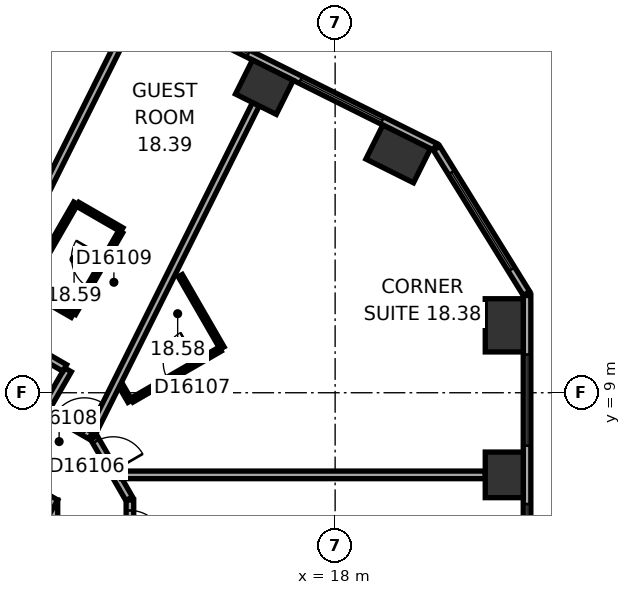
"""IFC4 building model, lengths in metres.
Left out: names, types, materials, properties, quantities, classifications, styles, units other than length and angle.
Written with IfcOpenShell. Run it as: python <this file> out.ifc"""

import sys

from ifc_helpers import new_model, si_unit, direction, frame, frame_2d, origin, origin_2d, place, context, subcontext, project, spatial, rectangle, extrude, element, fill, save


model = new_model("IFC4")
c1 = context("Model", 3, precision=1e-05, world=origin(), true_north=direction((0.0, 1.0)))
c2 = subcontext(c1, "Body", "Model", "MODEL_VIEW")
j1 = project(units=[si_unit("LENGTHUNIT", "METRE"), si_unit("PLANEANGLEUNIT", "RADIAN")], contexts=[c1])
p1 = place(None, origin())
s1 = spatial("IfcSite", under=j1, at=p1, CompositionType="ELEMENT")
p2 = place(p1, origin())
s2 = spatial("IfcBuilding", under=s1, at=p2, CompositionType="ELEMENT")
p3 = place(p2, frame((0.0, 0.0, 83.6)))
s3 = spatial("IfcBuildingStorey", under=s2, at=p3, CompositionType="ELEMENT", Elevation=83.6)
p4 = place(p3, frame((22.45, 6.839, 0.0), z_axis=(0.0, 0.0, 1.0), x_axis=(0.0, 1.0, 0.0)))
e1 = element("IfcColumn", 1, at=p4, inside=s3, PredefinedType="COLUMN", context=c2, shape_type="SweptSolid", body=[
    extrude(rectangle(XDim=1.2, YDim=1.0, at=origin_2d()), origin(), (0.0, 0.0, 1.0), 3.3),
])
for number, where, z_axis, x_axis in (
    (2, (22.45, 10.774, 0.0), (0.0, 0.0, 1.0), (0.0, 1.0, 0.0)),
    (3, (19.659, 15.284, 0.0), (0.0, 0.0, 1.0), (-0.895, 0.446, 0.0)),
):
    element("IfcColumn", number, at=place(p3, frame(where, z_axis=z_axis, x_axis=x_axis)), inside=s3, PredefinedType="COLUMN", context=c2, shape_type="SweptSolid", body=[
        extrude(rectangle(XDim=1.4, YDim=1.0, at=origin_2d()), origin(), (0.0, 0.0, 1.0), 3.3),
    ])
p5 = place(p3, frame((16.138, 17.04, 0.0), z_axis=(0.0, 0.0, 1.0), x_axis=(-0.894934361602, 0.44619781311, 0.0)))
e4 = element("IfcColumn", 4, at=p5, inside=s3, PredefinedType="COLUMN", context=c2, shape_type="SweptSolid", body=[
    extrude(rectangle(XDim=1.2, YDim=1.0, at=origin_2d()), origin(), (0.0, 0.0, 1.0), 3.3),
])
p6 = place(p3, frame((10.1, -6.177, 0.0), z_axis=(0.0, 0.0, 1.0), x_axis=(0.0, 1.0, 0.0)))
e5 = element("IfcWall", 5, at=p6, inside=s3, PredefinedType="SHEAR", context=c2, shape_type="SweptSolid", body=[
    extrude(rectangle(XDim=12.355, YDim=1.2, at=frame_2d((6.177, 0.0))), origin(), (0.0, 0.0, 1.0), 3.3),
])
p7 = place(p6, frame((6.378, 0.0, 0.0)))
e6 = element("IfcOpeningElement", 6, at=p7, cuts=e5, PredefinedType="OPENING", context=c2, shape_type="SweptSolid", body=[
    extrude(rectangle(XDim=1.5, YDim=2.1, at=frame_2d((0.75, 1.05))), frame((0.0, 0.61, 0.0), z_axis=(0.0, -1.0, 0.0), x_axis=(1.0, 0.0, 0.0)), (0.0, 0.0, 1.0), 1.22),
])
p8 = place(p6, frame((1.828, 0.0, 0.0)))
e7 = element("IfcOpeningElement", 7, at=p8, cuts=e5, PredefinedType="OPENING", context=c2, shape_type="SweptSolid", body=[
    extrude(rectangle(XDim=1.1, YDim=2.1, at=frame_2d((0.55, 1.05))), frame((0.0, 0.61, 0.0), z_axis=(0.0, -1.0, 0.0), x_axis=(1.0, 0.0, 0.0)), (0.0, 0.0, 1.0), 1.22),
])
p9 = place(p6, frame((4.427, 0.0, 0.0)))
e8 = element("IfcOpeningElement", 8, at=p9, cuts=e5, PredefinedType="OPENING", context=c2, shape_type="SweptSolid", body=[
    extrude(rectangle(XDim=1.1, YDim=2.1, at=frame_2d((0.55, 1.05))), frame((0.0, 0.61, 0.0), z_axis=(0.0, -1.0, 0.0), x_axis=(1.0, 0.0, 0.0)), (0.0, 0.0, 1.0), 1.22),
])
p10 = place(p3, frame((10.4, 5.658, 0.0), z_axis=(0.0, 0.0, 1.0), x_axis=(-0.866021384402, 0.500006961711, 0.0)))
e9 = element("IfcWall", 9, at=p10, inside=s3, PredefinedType="SHEAR", context=c2, shape_type="SweptSolid", body=[
    extrude(rectangle(XDim=12.355, YDim=1.2, at=frame_2d((6.178, 0.0))), origin(), (0.0, 0.0, 1.0), 3.3),
])
p11 = place(p10, frame((2.728, 0.0, 0.0)))
e10 = element("IfcOpeningElement", 10, at=p11, cuts=e9, PredefinedType="OPENING", context=c2, shape_type="SweptSolid", body=[
    extrude(rectangle(XDim=1.1, YDim=2.1, at=frame_2d((0.55, 1.05))), frame((0.0, 0.61, 0.0), z_axis=(0.0, -1.0, 0.0), x_axis=(1.0, 0.0, 0.0)), (0.0, 0.0, 1.0), 1.22),
])
p12 = place(p10, frame((5.328, 0.0, 0.0)))
e11 = element("IfcOpeningElement", 11, at=p12, cuts=e9, PredefinedType="OPENING", context=c2, shape_type="SweptSolid", body=[
    extrude(rectangle(XDim=1.1, YDim=2.1, at=frame_2d((0.55, 1.05))), frame((0.0, 0.61, 0.0), z_axis=(0.0, -1.0, 0.0), x_axis=(1.0, 0.0, 0.0)), (0.0, 0.0, 1.0), 1.22),
])
p13 = place(p10, frame((7.928, 0.0, 0.0)))
e12 = element("IfcOpeningElement", 12, at=p13, cuts=e9, PredefinedType="OPENING", context=c2, shape_type="SweptSolid", body=[
    extrude(rectangle(XDim=1.1, YDim=2.1, at=frame_2d((0.55, 1.05))), frame((0.0, 0.61, 0.0), z_axis=(0.0, -1.0, 0.0), x_axis=(1.0, 0.0, 0.0)), (0.0, 0.0, 1.0), 1.22),
])
p14 = place(p3, frame((23.05, -9.687, 0.0), z_axis=(0.0, 0.0, 1.0), x_axis=(0.0, 1.0, 0.0)))
e13 = element("IfcWall", 13, at=p14, inside=s3, PredefinedType="STANDARD", context=c2, shape_type="SweptSolid", body=[
    extrude(rectangle(XDim=21.246, YDim=0.2, at=frame_2d((10.623, 0.0))), origin(), (0.0, 0.0, 1.0), 3.3),
])
p15 = place(p14, frame((1.555, 0.0, 0.8)))
e14 = element("IfcOpeningElement", 14, at=p15, cuts=e13, PredefinedType="OPENING", context=c2, shape_type="SweptSolid", body=[
    extrude(rectangle(XDim=2.4, YDim=1.7, at=frame_2d((1.2, 0.85))), frame((0.0, 0.11, 0.0), z_axis=(0.0, -1.0, 0.0), x_axis=(1.0, 0.0, 0.0)), (0.0, 0.0, 1.0), 0.22),
])
p16 = place(p14, frame((5.489, 0.0, 0.8)))
e15 = element("IfcOpeningElement", 15, at=p16, cuts=e13, PredefinedType="OPENING", context=c2, shape_type="SweptSolid", body=[
    extrude(rectangle(XDim=2.4, YDim=1.7, at=frame_2d((1.2, 0.85))), frame((0.0, 0.11, 0.0), z_axis=(0.0, -1.0, 0.0), x_axis=(1.0, 0.0, 0.0)), (0.0, 0.0, 1.0), 0.22),
])
p17 = place(p14, frame((9.424, 0.0, 0.8)))
e16 = element("IfcOpeningElement", 16, at=p17, cuts=e13, PredefinedType="OPENING", context=c2, shape_type="SweptSolid", body=[
    extrude(rectangle(XDim=2.4, YDim=1.7, at=frame_2d((1.2, 0.85))), frame((0.0, 0.11, 0.0), z_axis=(0.0, -1.0, 0.0), x_axis=(1.0, 0.0, 0.0)), (0.0, 0.0, 1.0), 0.22),
])
p18 = place(p14, frame((13.358, 0.0, 0.8)))
e17 = element("IfcOpeningElement", 17, at=p18, cuts=e13, PredefinedType="OPENING", context=c2, shape_type="SweptSolid", body=[
    extrude(rectangle(XDim=2.4, YDim=1.7, at=frame_2d((1.2, 0.85))), frame((0.0, 0.11, 0.0), z_axis=(0.0, -1.0, 0.0), x_axis=(1.0, 0.0, 0.0)), (0.0, 0.0, 1.0), 0.22),
])
p19 = place(p14, frame((17.293, 0.0, 0.8)))
e18 = element("IfcOpeningElement", 18, at=p19, cuts=e13, PredefinedType="OPENING", context=c2, shape_type="SweptSolid", body=[
    extrude(rectangle(XDim=2.4, YDim=1.7, at=frame_2d((1.2, 0.85))), frame((0.0, 0.11, 0.0), z_axis=(0.0, -1.0, 0.0), x_axis=(1.0, 0.0, 0.0)), (0.0, 0.0, 1.0), 0.22),
])
p20 = place(p3, frame((23.035, 11.612, 0.0), z_axis=(0.0, 0.0, 1.0), x_axis=(-0.526160091227, 0.850385535155, 0.0)))
e19 = element("IfcWall", 19, at=p20, inside=s3, PredefinedType="STANDARD", context=c2, shape_type="SweptSolid", body=[
    extrude(rectangle(XDim=4.494, YDim=0.2, at=frame_2d((2.247, 0.0))), origin(), (0.0, 0.0, 1.0), 3.3),
])
p21 = place(p20, frame((0.747, 0.0, 0.8)))
e20 = element("IfcOpeningElement", 20, at=p21, cuts=e19, PredefinedType="OPENING", context=c2, shape_type="SweptSolid", body=[
    extrude(rectangle(XDim=3.0, YDim=1.7, at=frame_2d((1.5, 0.85))), frame((0.0, 0.11, 0.0), z_axis=(0.0, -1.0, 0.0), x_axis=(1.0, 0.0, 0.0)), (0.0, 0.0, 1.0), 0.22),
])
p22 = place(p3, frame((20.63, 15.47, 0.0), z_axis=(0.0, 0.0, 1.0), x_axis=(-0.894934518609, 0.446197498203, 0.0)))
e21 = element("IfcWall", 21, at=p22, inside=s3, PredefinedType="STANDARD", context=c2, shape_type="SweptSolid", body=[
    extrude(rectangle(XDim=21.246, YDim=0.2, at=frame_2d((10.623, 0.0))), origin(), (0.0, 0.0, 1.0), 3.3),
])
p23 = place(p22, frame((1.553, 0.0, 0.8)))
e22 = element("IfcOpeningElement", 22, at=p23, cuts=e21, PredefinedType="OPENING", context=c2, shape_type="SweptSolid", body=[
    extrude(rectangle(XDim=2.4, YDim=1.7, at=frame_2d((1.2, 0.85))), frame((0.0, 0.11, 0.0), z_axis=(0.0, -1.0, 0.0), x_axis=(1.0, 0.0, 0.0)), (0.0, 0.0, 1.0), 0.22),
])
p24 = place(p22, frame((5.488, 0.0, 0.8)))
e23 = element("IfcOpeningElement", 23, at=p24, cuts=e21, PredefinedType="OPENING", context=c2, shape_type="SweptSolid", body=[
    extrude(rectangle(XDim=2.4, YDim=1.7, at=frame_2d((1.2, 0.85))), frame((0.0, 0.11, 0.0), z_axis=(0.0, -1.0, 0.0), x_axis=(1.0, 0.0, 0.0)), (0.0, 0.0, 1.0), 0.22),
])
p25 = place(p22, frame((9.422, 0.0, 0.8)))
e24 = element("IfcOpeningElement", 24, at=p25, cuts=e21, PredefinedType="OPENING", context=c2, shape_type="SweptSolid", body=[
    extrude(rectangle(XDim=2.4, YDim=1.7, at=frame_2d((1.2, 0.85))), frame((0.0, 0.11, 0.0), z_axis=(0.0, -1.0, 0.0), x_axis=(1.0, 0.0, 0.0)), (0.0, 0.0, 1.0), 0.22),
])
p26 = place(p22, frame((13.357, 0.0, 0.8)))
e25 = element("IfcOpeningElement", 25, at=p26, cuts=e21, PredefinedType="OPENING", context=c2, shape_type="SweptSolid", body=[
    extrude(rectangle(XDim=2.4, YDim=1.7, at=frame_2d((1.2, 0.85))), frame((0.0, 0.11, 0.0), z_axis=(0.0, -1.0, 0.0), x_axis=(1.0, 0.0, 0.0)), (0.0, 0.0, 1.0), 0.22),
])
p27 = place(p22, frame((17.292, 0.0, 0.8)))
e26 = element("IfcOpeningElement", 26, at=p27, cuts=e21, PredefinedType="OPENING", context=c2, shape_type="SweptSolid", body=[
    extrude(rectangle(XDim=2.4, YDim=1.7, at=frame_2d((1.2, 0.85))), frame((0.0, 0.11, 0.0), z_axis=(0.0, -1.0, 0.0), x_axis=(1.0, 0.0, 0.0)), (0.0, 0.0, 1.0), 0.22),
])
p28 = place(p3, frame((9.875, 11.736, 0.0), z_axis=(0.0, 0.0, 1.0), x_axis=(0.499936506574, 0.866062058628, 0.0)))
e27 = element("IfcWall", 27, at=p28, inside=s3, PredefinedType="PARTITIONING", context=c2, shape_type="SweptSolid", body=[
    extrude(rectangle(XDim=2.6, YDim=0.12, at=frame_2d((1.3, 0.0))), origin(), (0.0, 0.0, 1.0), 3.05),
])
p29 = place(p3, frame((10.371, 8.561, 0.0), z_axis=(0.0, 0.0, 1.0), x_axis=(0.499986357472, 0.866033280158, 0.0)))
e28 = element("IfcWall", 28, at=p29, inside=s3, PredefinedType="PARTITIONING", context=c2, shape_type="SweptSolid", body=[
    extrude(rectangle(XDim=1.201, YDim=0.2, at=frame_2d((0.601, 0.0))), origin(), (0.0, 0.0, 1.0), 3.05),
])
p30 = place(p3, frame((10.885, 9.652, 0.0), z_axis=(0.0, 0.0, 1.0), x_axis=(-0.866033277307, 0.499986362411, 0.0)))
e29 = element("IfcWall", 29, at=p30, inside=s3, PredefinedType="PARTITIONING", context=c2, shape_type="SweptSolid", body=[
    extrude(rectangle(XDim=8.702, YDim=0.2, at=frame_2d((4.351, 0.0))), origin(), (0.0, 0.0, 1.0), 3.05),
])
p31 = place(p30, frame((3.844, 0.0, 0.0)))
e30 = element("IfcOpeningElement", 30, at=p31, cuts=e29, PredefinedType="OPENING", context=c2, shape_type="SweptSolid", body=[
    extrude(rectangle(XDim=0.9, YDim=2.1, at=frame_2d((0.45, 1.05))), frame((0.0, 0.11, 0.0), z_axis=(0.0, -1.0, 0.0), x_axis=(1.0, 0.0, 0.0)), (0.0, 0.0, 1.0), 0.22),
])
for number, where, z_axis, x_axis in (
    (31, (11.087, 11.036, 0.0), (0.0, 0.0, 1.0), (-0.866, 0.5, 0.0)),
    (32, (11.226, 13.958, 0.0), (0.0, 0.0, 1.0), (0.866, -0.5, 0.0)),
):
    element("IfcWall", number, at=place(p3, frame(where, z_axis=z_axis, x_axis=x_axis)), inside=s3, PredefinedType="PARTITIONING", context=c2, shape_type="SweptSolid", body=[
        extrude(rectangle(XDim=1.34, YDim=0.12, at=frame_2d((0.67, 0.0))), origin(), (0.0, 0.0, 1.0), 3.05),
    ])
p32 = place(p3, frame((11.566, 7.871, 0.0), z_axis=(0.0, 0.0, 1.0), x_axis=(-0.866004557827, 0.500036104519, 0.0)))
e33 = element("IfcWall", 33, at=p32, inside=s3, PredefinedType="PARTITIONING", context=c2, shape_type="SweptSolid", body=[
    extrude(rectangle(XDim=1.28, YDim=0.2, at=frame_2d((0.64, 0.0))), origin(), (0.0, 0.0, 1.0), 3.05),
])
p33 = place(p32, frame((0.19, 0.0, 0.0)))
e34 = element("IfcOpeningElement", 34, at=p33, cuts=e33, PredefinedType="OPENING", context=c2, shape_type="SweptSolid", body=[
    extrude(rectangle(XDim=0.9, YDim=2.1, at=frame_2d((0.45, 1.05))), frame((0.0, 0.11, 0.0), z_axis=(0.0, -1.0, 0.0), x_axis=(1.0, 0.0, 0.0)), (0.0, 0.0, 1.0), 0.22),
])
p34 = place(p3, frame((12.357, 13.236, 0.0), z_axis=(0.0, 0.0, 1.0), x_axis=(-0.50000366821, -0.866023285932, 0.0)))
e35 = element("IfcWall", 35, at=p34, inside=s3, PredefinedType="PARTITIONING", context=c2, shape_type="SweptSolid", body=[
    extrude(rectangle(XDim=2.48, YDim=0.12, at=frame_2d((1.24, 0.0))), origin(), (0.0, 0.0, 1.0), 3.05),
])
p35 = place(p34, frame((0.79, 0.0, 0.0)))
e36 = element("IfcOpeningElement", 36, at=p35, cuts=e35, PredefinedType="OPENING", context=c2, shape_type="SweptSolid", body=[
    extrude(rectangle(XDim=0.9, YDim=2.1, at=frame_2d((0.45, 1.05))), frame((0.0, 0.07, 0.0), z_axis=(0.0, -1.0, 0.0), x_axis=(1.0, 0.0, 0.0)), (0.0, 0.0, 1.0), 0.14),
])
p36 = place(p3, frame((12.393, 18.348, 0.0), z_axis=(0.0, 0.0, 1.0), x_axis=(-0.446176022699, -0.894945225569, 0.0)))
e37 = element("IfcWall", 37, at=p36, inside=s3, PredefinedType="PARTITIONING", context=c2, shape_type="SweptSolid", body=[
    extrude(rectangle(XDim=8.191, YDim=0.2, at=frame_2d((4.095, 0.0))), origin(), (0.0, 0.0, 1.0), 2.6),
])
p37 = place(p3, frame((12.58, 6.212, 0.0), z_axis=(0.0, 0.0, 1.0), x_axis=(-0.500063286585, 0.865988862174, 0.0)))
e38 = element("IfcWall", 38, at=p37, inside=s3, PredefinedType="PARTITIONING", context=c2, shape_type="SweptSolid", body=[
    extrude(rectangle(XDim=1.86, YDim=0.2, at=frame_2d((0.93, 0.0))), origin(), (0.0, 0.0, 1.0), 3.05),
])
p38 = place(p37, frame((0.842, 0.0, 0.0)))
e39 = element("IfcOpeningElement", 39, at=p38, cuts=e38, PredefinedType="OPENING", context=c2, shape_type="SweptSolid", body=[
    extrude(rectangle(XDim=0.9, YDim=2.1, at=frame_2d((0.45, 1.05))), frame((0.0, 0.11, 0.0), z_axis=(0.0, -1.0, 0.0), x_axis=(1.0, 0.0, 0.0)), (0.0, 0.0, 1.0), 0.22),
])
p39 = place(p3, frame((12.6, 3.004, 0.0), z_axis=(0.0, 0.0, 1.0), x_axis=(0.0, 1.0, 0.0)))
e40 = element("IfcWall", 40, at=p39, inside=s3, PredefinedType="PARTITIONING", context=c2, shape_type="SweptSolid", body=[
    extrude(rectangle(XDim=3.173, YDim=0.2, at=frame_2d((1.586, 0.0))), origin(), (0.0, 0.0, 1.0), 3.05),
])
p40 = place(p39, frame((1.998, 0.0, 0.0)))
e41 = element("IfcOpeningElement", 41, at=p40, cuts=e40, PredefinedType="OPENING", context=c2, shape_type="SweptSolid", body=[
    extrude(rectangle(XDim=0.9, YDim=2.1, at=frame_2d((0.45, 1.05))), frame((0.0, 0.11, 0.0), z_axis=(0.0, -1.0, 0.0), x_axis=(1.0, 0.0, 0.0)), (0.0, 0.0, 1.0), 0.22),
])
p41 = place(p3, frame((12.601, 8.776, 0.0), z_axis=(0.0, 0.0, 1.0), x_axis=(-0.500166486798, 0.865929261247, 0.0)))
e42 = element("IfcWall", 42, at=p41, inside=s3, PredefinedType="PARTITIONING", context=c2, shape_type="SweptSolid", body=[
    extrude(rectangle(XDim=0.476, YDim=0.12, at=frame_2d((0.238, 0.0))), origin(), (0.0, 0.0, 1.0), 3.05),
])
p42 = place(p3, frame((13.926, 12.081, 0.0), z_axis=(0.0, 0.0, 1.0), x_axis=(0.499994660107, -0.866028486751, 0.0)))
e43 = element("IfcWall", 43, at=p42, inside=s3, PredefinedType="PARTITIONING", context=c2, shape_type="SweptSolid", body=[
    extrude(rectangle(XDim=2.2, YDim=0.12, at=frame_2d((1.1, 0.0))), origin(), (0.0, 0.0, 1.0), 3.05),
])
p43 = place(p3, frame((14.974, 10.146, 0.0), z_axis=(0.0, 0.0, 1.0), x_axis=(-0.86599746015, -0.500048396672, 0.0)))
e44 = element("IfcWall", 44, at=p43, inside=s3, PredefinedType="PARTITIONING", context=c2, shape_type="SweptSolid", body=[
    extrude(rectangle(XDim=2.68, YDim=0.12, at=frame_2d((1.34, 0.0))), origin(), (0.0, 0.0, 1.0), 3.05),
])
p44 = place(p43, frame((0.69, 0.0, 0.0)))
e45 = element("IfcOpeningElement", 45, at=p44, cuts=e44, PredefinedType="OPENING", context=c2, shape_type="SweptSolid", body=[
    extrude(rectangle(XDim=0.9, YDim=2.1, at=frame_2d((0.45, 1.05))), frame((0.0, 0.07, 0.0), z_axis=(0.0, -1.0, 0.0), x_axis=(1.0, 0.0, 0.0)), (0.0, 0.0, 1.0), 0.14),
])
p45 = place(p3, frame((15.915, 16.592, 0.0), z_axis=(0.0, 0.0, 1.0), x_axis=(-0.446199736347, -0.894933402709, 0.0)))
e46 = element("IfcWall", 46, at=p45, inside=s3, PredefinedType="PARTITIONING", context=c2, shape_type="SweptSolid", body=[
    extrude(rectangle(XDim=9.635, YDim=0.2, at=frame_2d((4.817, 0.0))), origin(), (0.0, 0.0, 1.0), 3.05),
])
p46 = place(p3, frame((21.95, 6.839, 0.0), z_axis=(0.0, 0.0, 1.0), x_axis=(-1.0, 0.0, 0.0)))
e47 = element("IfcWall", 47, at=p46, inside=s3, PredefinedType="PARTITIONING", context=c2, shape_type="SweptSolid", body=[
    extrude(rectangle(XDim=9.572, YDim=0.2, at=frame_2d((4.786, 0.0))), origin(), (0.0, 0.0, 1.0), 3.05),
])
p47 = place(p18, origin())
e48 = element("IfcWindow", 48, at=p47, inside=s3, PartitioningType="SINGLE_PANEL", PredefinedType="WINDOW", context=c2, shape_type="SweptSolid", body=[
    extrude(rectangle(XDim=2.4, YDim=1.7, at=frame_2d((1.2, 0.85))), frame((0.0, 0.03, 0.0), z_axis=(0.0, -1.0, 0.0), x_axis=(1.0, 0.0, 0.0)), (0.0, 0.0, 1.0), 0.06),
])
fill(e17, e48)
p48 = place(p19, origin())
e49 = element("IfcWindow", 49, at=p48, inside=s3, PartitioningType="SINGLE_PANEL", PredefinedType="WINDOW", context=c2, shape_type="SweptSolid", body=[
    extrude(rectangle(XDim=2.4, YDim=1.7, at=frame_2d((1.2, 0.85))), frame((0.0, 0.03, 0.0), z_axis=(0.0, -1.0, 0.0), x_axis=(1.0, 0.0, 0.0)), (0.0, 0.0, 1.0), 0.06),
])
fill(e18, e49)
p49 = place(p21, origin())
e50 = element("IfcWindow", 50, at=p49, inside=s3, PartitioningType="SINGLE_PANEL", PredefinedType="WINDOW", context=c2, shape_type="SweptSolid", body=[
    extrude(rectangle(XDim=3.0, YDim=1.7, at=frame_2d((1.5, 0.85))), frame((0.0, 0.03, 0.0), z_axis=(0.0, -1.0, 0.0), x_axis=(1.0, 0.0, 0.0)), (0.0, 0.0, 1.0), 0.06),
])
fill(e20, e50)
p50 = place(p23, origin())
e51 = element("IfcWindow", 51, at=p50, inside=s3, PartitioningType="SINGLE_PANEL", PredefinedType="WINDOW", context=c2, shape_type="SweptSolid", body=[
    extrude(rectangle(XDim=2.4, YDim=1.7, at=frame_2d((1.2, 0.85))), frame((0.0, 0.03, 0.0), z_axis=(0.0, -1.0, 0.0), x_axis=(1.0, 0.0, 0.0)), (0.0, 0.0, 1.0), 0.06),
])
fill(e22, e51)
p51 = place(p24, origin())
e52 = element("IfcWindow", 52, at=p51, inside=s3, PartitioningType="SINGLE_PANEL", PredefinedType="WINDOW", context=c2, shape_type="SweptSolid", body=[
    extrude(rectangle(XDim=2.4, YDim=1.7, at=frame_2d((1.2, 0.85))), frame((0.0, 0.03, 0.0), z_axis=(0.0, -1.0, 0.0), x_axis=(1.0, 0.0, 0.0)), (0.0, 0.0, 1.0), 0.06),
])
fill(e23, e52)
p52 = place(p40, origin())
e53 = element("IfcDoor", 53, at=p52, inside=s3, OperationType="SINGLE_SWING_LEFT", PredefinedType="DOOR", context=c2, shape_type="SweptSolid", body=[
    extrude(rectangle(XDim=0.9, YDim=2.1, at=frame_2d((0.45, 1.05))), frame((0.0, 0.025, 0.0), z_axis=(0.0, -1.0, 0.0), x_axis=(1.0, 0.0, 0.0)), (0.0, 0.0, 1.0), 0.05),
])
fill(e41, e53)
p53 = place(p38, origin())
e54 = element("IfcDoor", 54, at=p53, inside=s3, OperationType="SINGLE_SWING_LEFT", PredefinedType="DOOR", context=c2, shape_type="SweptSolid", body=[
    extrude(rectangle(XDim=0.9, YDim=2.1, at=frame_2d((0.45, 1.05))), frame((0.0, 0.025, 0.0), z_axis=(0.0, -1.0, 0.0), x_axis=(1.0, 0.0, 0.0)), (0.0, 0.0, 1.0), 0.05),
])
fill(e39, e54)
p54 = place(p44, origin())
e55 = element("IfcDoor", 55, at=p54, inside=s3, OperationType="SINGLE_SWING_LEFT", PredefinedType="DOOR", context=c2, shape_type="SweptSolid", body=[
    extrude(rectangle(XDim=0.9, YDim=2.1, at=frame_2d((0.45, 1.05))), frame((0.0, 0.025, 0.0), z_axis=(0.0, -1.0, 0.0), x_axis=(1.0, 0.0, 0.0)), (0.0, 0.0, 1.0), 0.05),
])
fill(e45, e55)
p55 = place(p33, origin())
e56 = element("IfcDoor", 56, at=p55, inside=s3, OperationType="SINGLE_SWING_LEFT", PredefinedType="DOOR", context=c2, shape_type="SweptSolid", body=[
    extrude(rectangle(XDim=0.9, YDim=2.1, at=frame_2d((0.45, 1.05))), frame((0.0, 0.025, 0.0), z_axis=(0.0, -1.0, 0.0), x_axis=(1.0, 0.0, 0.0)), (0.0, 0.0, 1.0), 0.05),
])
fill(e34, e56)
p56 = place(p35, origin())
e57 = element("IfcDoor", 57, at=p56, inside=s3, OperationType="SINGLE_SWING_LEFT", PredefinedType="DOOR", context=c2, shape_type="SweptSolid", body=[
    extrude(rectangle(XDim=0.9, YDim=2.1, at=frame_2d((0.45, 1.05))), frame((0.0, 0.025, 0.0), z_axis=(0.0, -1.0, 0.0), x_axis=(1.0, 0.0, 0.0)), (0.0, 0.0, 1.0), 0.05),
])
fill(e36, e57)
save(model, sys.argv[1])
